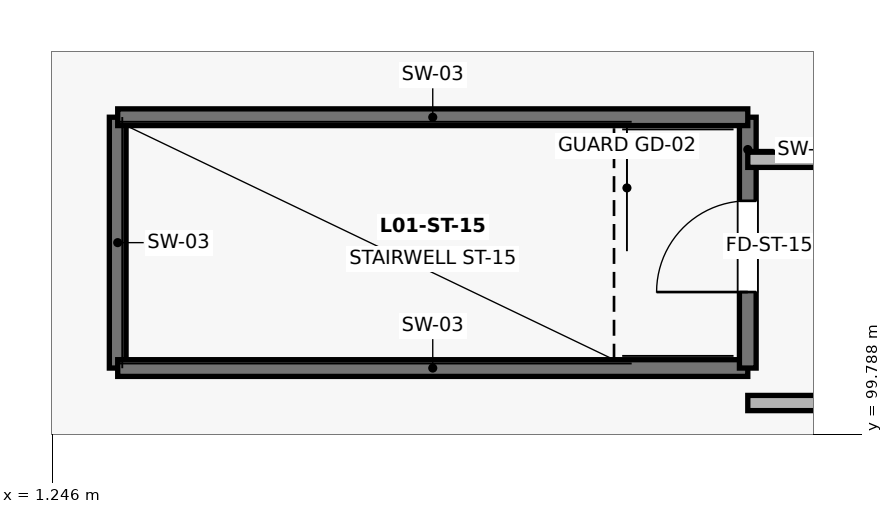
"""IFC4 building model, lengths in metres.
Left out: names, types, materials, properties, quantities, classifications, styles, units other than length and angle.
Written with IfcOpenShell. Run it as: python <this file> out.ifc"""

import sys

from ifc_helpers import new_model, si_unit, direction, frame, frame_2d, origin, place, context, subcontext, project, spatial, rectangle, extrude, element, fill, save


model = new_model("IFC4")
c1 = context("Model", 3, precision=1e-05, world=origin(), true_north=direction((0.0, 1.0)))
c2 = subcontext(c1, "Body", "Model", "MODEL_VIEW")
j1 = project(units=[si_unit("LENGTHUNIT", "METRE"), si_unit("PLANEANGLEUNIT", "RADIAN")], contexts=[c1])
p1 = place(None, origin())
s1 = spatial("IfcSite", under=j1, at=p1, CompositionType="ELEMENT")
p2 = place(p1, origin())
s2 = spatial("IfcBuilding", under=s1, at=p2, CompositionType="ELEMENT")
p3 = place(p2, frame((0.0, 0.0, 6.6)))
s3 = spatial("IfcBuildingStorey", under=s2, at=p3, CompositionType="ELEMENT", Elevation=6.6)
p4 = place(p3, frame((2.11, 103.96, 0.0), z_axis=(0.0, 0.0, 1.0), x_axis=(0.0, -1.0, 0.0)))
e1 = element("IfcWall", 1, at=p4, inside=s3, PredefinedType="SHEAR", context=c2, shape_type="SweptSolid", body=[
    extrude(rectangle(XDim=3.3, YDim=0.22, at=frame_2d((1.65, 0.0))), origin(), (0.0, 0.0, 1.0), 4.47),
])
p5 = place(p3, frame((2.11, 100.66, 0.0), z_axis=(0.0, 0.0, 1.0), x_axis=(1.0, 0.0, 0.0)))
e2 = element("IfcWall", 2, at=p5, inside=s3, PredefinedType="SHEAR", context=c2, shape_type="SweptSolid", body=[
    extrude(rectangle(XDim=8.29, YDim=0.22, at=frame_2d((4.145, 0.0))), origin(), (0.0, 0.0, 1.0), 4.47),
])
p6 = place(p3, frame((10.4, 100.66, 0.0), z_axis=(0.0, 0.0, 1.0), x_axis=(0.0, 1.0, 0.0)))
e3 = element("IfcWall", 3, at=p6, inside=s3, PredefinedType="SHEAR", context=c2, shape_type="SweptSolid", body=[
    extrude(rectangle(XDim=3.3, YDim=0.22, at=frame_2d((1.65, 0.0))), origin(), (0.0, 0.0, 1.0), 4.47),
])
p7 = place(p6, frame((1.0, 0.0, 0.0)))
e4 = element("IfcOpeningElement", 4, at=p7, cuts=e3, PredefinedType="OPENING", context=c2, shape_type="SweptSolid", body=[
    extrude(rectangle(XDim=1.2, YDim=2.2, at=frame_2d((0.6, 1.1))), frame((0.0, 0.125, 0.0), z_axis=(0.0, -1.0, 0.0), x_axis=(1.0, 0.0, 0.0)), (0.0, 0.0, 1.0), 0.25),
])
p8 = place(p3, frame((10.4, 103.96, 0.0), z_axis=(0.0, 0.0, 1.0), x_axis=(-1.0, 0.0, 0.0)))
e5 = element("IfcWall", 5, at=p8, inside=s3, PredefinedType="SHEAR", context=c2, shape_type="SweptSolid", body=[
    extrude(rectangle(XDim=8.29, YDim=0.22, at=frame_2d((4.145, 0.0))), origin(), (0.0, 0.0, 1.0), 4.47),
])
for number, where, z_axis, x_axis in (
    (6, (10.4, 100.2, 0.0), (0.0, 0.0, 1.0), (1.0, 0.0, 0.0)),
    (7, (10.4, 103.4, 0.0), (0.0, 0.0, 1.0), (1.0, 0.0, 0.0)),
):
    element("IfcWall", number, at=place(p3, frame(where, z_axis=z_axis, x_axis=x_axis)), inside=s3, PredefinedType="PARTITIONING", context=c2, shape_type="SweptSolid", body=[
        extrude(rectangle(XDim=7.8, YDim=0.2, at=frame_2d((3.9, 0.0))), origin(), (0.0, 0.0, 1.0), 3.253),
    ])
p9 = place(p7, origin())
e8 = element("IfcDoor", 8, at=p9, inside=s3, OperationType="SINGLE_SWING_LEFT", PredefinedType="DOOR", context=c2, shape_type="SweptSolid", body=[
    extrude(rectangle(XDim=1.2, YDim=2.2, at=frame_2d((0.6, 1.1))), frame((0.0, 0.025, 0.0), z_axis=(0.0, -1.0, 0.0), x_axis=(1.0, 0.0, 0.0)), (0.0, 0.0, 1.0), 0.05),
])
fill(e4, e8)
save(model, sys.argv[1])
